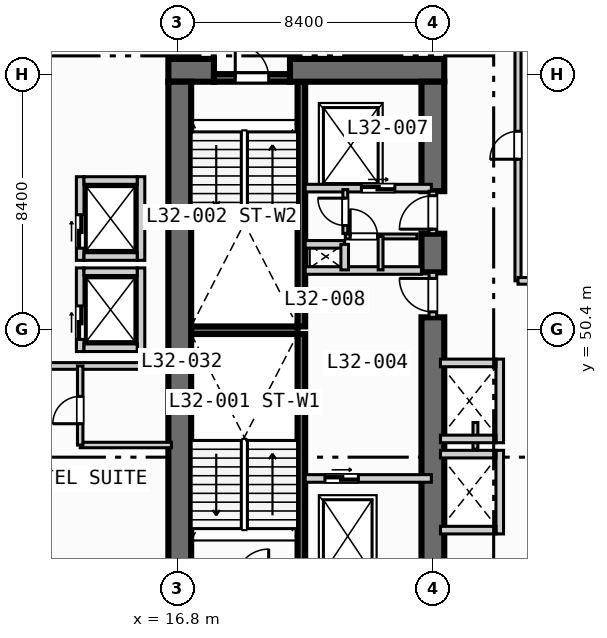
"""IFC4 building model, lengths in metres.
Left out: names, types, materials, properties, quantities, classifications, styles, units other than length and angle.
Written with IfcOpenShell. Run it as: python <this file> out.ifc"""

import sys

from ifc_helpers import new_model, si_unit, direction, frame, frame_2d, origin, place, context, subcontext, project, spatial, rectangle, extrude, element, fill, save


model = new_model("IFC4")
c1 = context("Model", 3, precision=1e-05, world=origin(), true_north=direction((0.0, 1.0)))
c2 = subcontext(c1, "Body", "Model", "MODEL_VIEW")
j1 = project(units=[si_unit("LENGTHUNIT", "METRE"), si_unit("PLANEANGLEUNIT", "RADIAN")], contexts=[c1])
p1 = place(None, origin())
s1 = spatial("IfcSite", under=j1, at=p1, CompositionType="ELEMENT")
p2 = place(p1, origin())
s2 = spatial("IfcBuilding", under=s1, at=p2, CompositionType="ELEMENT")
p3 = place(p2, frame((0.0, 0.0, 134.2)))
s3 = spatial("IfcBuildingStorey", under=s2, at=p3, CompositionType="ELEMENT", Elevation=134.2)
for number, where, z_axis, x_axis in (
    (1, (20.875, 42.2, 0.0), (0.0, 0.0, 1.0), (0.0, 1.0, 0.0)),
    (2, (20.875, 50.5, 0.0), (0.0, 0.0, 1.0), (0.0, 1.0, 0.0)),
):
    element("IfcWall", number, at=place(p3, frame(where, z_axis=z_axis, x_axis=x_axis)), inside=s3, PredefinedType="SOLIDWALL", context=c2, shape_type="SweptSolid", body=[
        extrude(rectangle(XDim=8.05, YDim=0.25, at=frame_2d((4.025, 0.0))), origin(), (0.0, 0.0, 1.0), 3.55),
    ])
p4 = place(p3, frame((17.25, 50.375, 0.0), z_axis=(0.0, 0.0, 1.0), x_axis=(1.0, 0.0, 0.0)))
e3 = element("IfcWall", 3, at=p4, inside=s3, PredefinedType="SOLIDWALL", context=c2, shape_type="SweptSolid", body=[
    extrude(rectangle(XDim=3.5, YDim=0.25, at=frame_2d((1.75, 0.0))), origin(), (0.0, 0.0, 1.0), 3.55),
])
p5 = place(p3, frame((16.5, 58.925, 0.0), z_axis=(0.0, 0.0, 1.0), x_axis=(1.0, 0.0, 0.0)))
e4 = element("IfcWall", 4, at=p5, inside=s3, PredefinedType="SHEAR", context=c2, shape_type="SweptSolid", body=[
    extrude(rectangle(XDim=1.5, YDim=0.75, at=frame_2d((0.75, 0.0))), origin(), (0.0, 0.0, 1.0), 3.55),
])
p6 = place(p3, frame((20.5, 58.925, 0.0), z_axis=(0.0, 0.0, 1.0), x_axis=(1.0, 0.0, 0.0)))
e5 = element("IfcWall", 5, at=p6, inside=s3, PredefinedType="SHEAR", context=c2, shape_type="SweptSolid", body=[
    extrude(rectangle(XDim=5.075, YDim=0.75, at=frame_2d((2.538, 0.0))), origin(), (0.0, 0.0, 1.0), 3.55),
])
p7 = place(p3, frame((16.875, 42.2, 0.0), z_axis=(0.0, 0.0, 1.0), x_axis=(0.0, 1.0, 0.0)))
e6 = element("IfcWall", 6, at=p7, inside=s3, PredefinedType="SHEAR", context=c2, shape_type="SweptSolid", body=[
    extrude(rectangle(XDim=16.35, YDim=0.75, at=frame_2d((8.175, 0.0))), origin(), (0.0, 0.0, 1.0), 3.55),
])
p8 = place(p3, frame((25.2, 42.2, 0.0), z_axis=(0.0, 0.0, 1.0), x_axis=(0.0, 1.0, 0.0)))
e7 = element("IfcWall", 7, at=p8, inside=s3, PredefinedType="SHEAR", context=c2, shape_type="SweptSolid", body=[
    extrude(rectangle(XDim=8.6, YDim=0.75, at=frame_2d((4.3, 0.0))), origin(), (0.0, 0.0, 1.0), 3.55),
])
p9 = place(p3, frame((25.2, 52.28, 0.0), z_axis=(0.0, 0.0, 1.0), x_axis=(0.0, 1.0, 0.0)))
e8 = element("IfcWall", 8, at=p9, inside=s3, PredefinedType="SHEAR", context=c2, shape_type="SweptSolid", body=[
    extrude(rectangle(XDim=1.27, YDim=0.75, at=frame_2d((0.635, 0.0))), origin(), (0.0, 0.0, 1.0), 3.55),
])
p10 = place(p3, frame((25.2, 54.95, 0.0), z_axis=(0.0, 0.0, 1.0), x_axis=(0.0, 1.0, 0.0)))
e9 = element("IfcWall", 9, at=p10, inside=s3, PredefinedType="SHEAR", context=c2, shape_type="SweptSolid", body=[
    extrude(rectangle(XDim=3.6, YDim=0.75, at=frame_2d((1.8, 0.0))), origin(), (0.0, 0.0, 1.0), 3.55),
])
p11 = place(p3, frame((18.0, 58.675, 0.0), z_axis=(0.0, 0.0, 1.0), x_axis=(1.0, 0.0, 0.0)))
e10 = element("IfcWall", 10, at=p11, inside=s3, PredefinedType="SOLIDWALL", context=c2, shape_type="SweptSolid", body=[
    extrude(rectangle(XDim=2.5, YDim=0.25, at=frame_2d((1.25, 0.0))), origin(), (0.0, 0.0, 1.0), 3.55),
])
p12 = place(p11, frame((0.7, 0.0, 0.0)))
e11 = element("IfcOpeningElement", 11, at=p12, cuts=e10, PredefinedType="OPENING", context=c2, shape_type="SweptSolid", body=[
    extrude(rectangle(XDim=1.1, YDim=2.15, at=frame_2d((0.55, 1.075))), frame((0.0, 0.135, 0.0), z_axis=(0.0, -1.0, 0.0), x_axis=(1.0, 0.0, 0.0)), (0.0, 0.0, 1.0), 0.27),
])
p13 = place(p3, frame((21.0, 45.5, 0.0), z_axis=(0.0, 0.0, 1.0), x_axis=(1.0, 0.0, 0.0)))
e12 = element("IfcWall", 12, at=p13, inside=s3, PredefinedType="SOLIDWALL", context=c2, shape_type="SweptSolid", body=[
    extrude(rectangle(XDim=4.15, YDim=0.25, at=frame_2d((2.075, 0.0))), origin(), (0.0, 0.0, 1.0), 3.55),
])
p14 = place(p13, frame((0.65, 0.0, 0.0)))
e13 = element("IfcOpeningElement", 13, at=p14, cuts=e12, PredefinedType="OPENING", context=c2, shape_type="SweptSolid", body=[
    extrude(rectangle(XDim=1.1, YDim=2.15, at=frame_2d((0.55, 1.075))), frame((0.0, 0.135, 0.0), z_axis=(0.0, -1.0, 0.0), x_axis=(1.0, 0.0, 0.0)), (0.0, 0.0, 1.0), 0.27),
])
p15 = place(p3, frame((25.2, 50.8, 0.0), z_axis=(0.0, 0.0, 1.0), x_axis=(0.0, 1.0, 0.0)))
e14 = element("IfcWall", 14, at=p15, inside=s3, PredefinedType="SOLIDWALL", context=c2, shape_type="SweptSolid", body=[
    extrude(rectangle(XDim=1.48, YDim=0.25, at=frame_2d((0.74, 0.0))), origin(), (0.0, 0.0, 1.0), 3.55),
])
p16 = place(p15, frame((0.18, 0.0, 0.0)))
e15 = element("IfcOpeningElement", 15, at=p16, cuts=e14, PredefinedType="OPENING", context=c2, shape_type="SweptSolid", body=[
    extrude(rectangle(XDim=1.1, YDim=2.15, at=frame_2d((0.55, 1.075))), frame((0.0, 0.135, 0.0), z_axis=(0.0, -1.0, 0.0), x_axis=(1.0, 0.0, 0.0)), (0.0, 0.0, 1.0), 0.27),
])
p17 = place(p3, frame((21.0, 52.34, 0.0), z_axis=(0.0, 0.0, 1.0), x_axis=(1.0, 0.0, 0.0)))
e16 = element("IfcWall", 16, at=p17, inside=s3, PredefinedType="SOLIDWALL", context=c2, shape_type="SweptSolid", body=[
    extrude(rectangle(XDim=3.825, YDim=0.25, at=frame_2d((1.913, 0.0))), origin(), (0.0, 0.0, 1.0), 3.55),
])
p18 = place(p3, frame((21.0, 55.05, 0.0), z_axis=(0.0, 0.0, 1.0), x_axis=(1.0, 0.0, 0.0)))
e17 = element("IfcWall", 17, at=p18, inside=s3, PredefinedType="SOLIDWALL", context=c2, shape_type="SweptSolid", body=[
    extrude(rectangle(XDim=4.15, YDim=0.25, at=frame_2d((2.075, 0.0))), origin(), (0.0, 0.0, 1.0), 3.55),
])
p19 = place(p18, frame((1.85, 0.0, 0.0)))
e18 = element("IfcOpeningElement", 18, at=p19, cuts=e17, PredefinedType="OPENING", context=c2, shape_type="SweptSolid", body=[
    extrude(rectangle(XDim=1.1, YDim=2.15, at=frame_2d((0.55, 1.075))), frame((0.0, 0.135, 0.0), z_axis=(0.0, -1.0, 0.0), x_axis=(1.0, 0.0, 0.0)), (0.0, 0.0, 1.0), 0.27),
])
p20 = place(p3, frame((25.2, 53.55, 0.0), z_axis=(0.0, 0.0, 1.0), x_axis=(0.0, 1.0, 0.0)))
e19 = element("IfcWall", 19, at=p20, inside=s3, PredefinedType="SOLIDWALL", context=c2, shape_type="SweptSolid", body=[
    extrude(rectangle(XDim=1.4, YDim=0.25, at=frame_2d((0.7, 0.0))), origin(), (0.0, 0.0, 1.0), 3.55),
])
p21 = place(p20, frame((0.15, 0.0, 0.0)))
e20 = element("IfcOpeningElement", 20, at=p21, cuts=e19, PredefinedType="OPENING", context=c2, shape_type="SweptSolid", body=[
    extrude(rectangle(XDim=1.1, YDim=2.15, at=frame_2d((0.55, 1.075))), frame((0.0, 0.135, 0.0), z_axis=(0.0, -1.0, 0.0), x_axis=(1.0, 0.0, 0.0)), (0.0, 0.0, 1.0), 0.27),
])
p22 = place(p3, frame((21.0, 53.2, 0.0), z_axis=(0.0, 0.0, 1.0), x_axis=(1.0, 0.0, 0.0)))
e21 = element("IfcWall", 21, at=p22, inside=s3, PredefinedType="SOLIDWALL", context=c2, shape_type="SweptSolid", body=[
    extrude(rectangle(XDim=1.3, YDim=0.25, at=frame_2d((0.65, 0.0))), origin(), (0.0, 0.0, 1.0), 3.55),
])
p23 = place(p3, frame((22.3, 52.36, 0.0), z_axis=(0.0, 0.0, 1.0), x_axis=(0.0, 1.0, 0.0)))
e22 = element("IfcWall", 22, at=p23, inside=s3, PredefinedType="SOLIDWALL", context=c2, shape_type="SweptSolid", body=[
    extrude(rectangle(XDim=0.84, YDim=0.25, at=frame_2d((0.42, 0.0))), origin(), (0.0, 0.0, 1.0), 3.55),
])
p24 = place(p3, frame((22.32, 53.56, 0.0), z_axis=(0.0, 0.0, 1.0), x_axis=(0.0, 1.0, 0.0)))
e23 = element("IfcWall", 23, at=p24, inside=s3, PredefinedType="PARTITIONING", context=c2, shape_type="SweptSolid", body=[
    extrude(rectangle(XDim=1.44, YDim=0.16, at=frame_2d((0.72, 0.0))), origin(), (0.0, 0.0, 1.0), 3.55),
])
p25 = place(p24, frame((0.26, 0.0, 0.0)))
e24 = element("IfcOpeningElement", 24, at=p25, cuts=e23, PredefinedType="OPENING", context=c2, shape_type="SweptSolid", body=[
    extrude(rectangle(XDim=0.9, YDim=2.1, at=frame_2d((0.45, 1.05))), frame((0.0, 0.09, 0.0), z_axis=(0.0, -1.0, 0.0), x_axis=(1.0, 0.0, 0.0)), (0.0, 0.0, 1.0), 0.18),
])
p26 = place(p3, frame((22.32, 53.46, 0.0), z_axis=(0.0, 0.0, 1.0), x_axis=(1.0, 0.0, 0.0)))
e25 = element("IfcWall", 25, at=p26, inside=s3, PredefinedType="PARTITIONING", context=c2, shape_type="SweptSolid", body=[
    extrude(rectangle(XDim=2.36, YDim=0.16, at=frame_2d((1.18, 0.0))), origin(), (0.0, 0.0, 1.0), 3.55),
])
p27 = place(p26, frame((0.16, 0.0, 0.0)))
e26 = element("IfcOpeningElement", 26, at=p27, cuts=e25, PredefinedType="OPENING", context=c2, shape_type="SweptSolid", body=[
    extrude(rectangle(XDim=0.9, YDim=2.1, at=frame_2d((0.45, 1.05))), frame((0.0, 0.09, 0.0), z_axis=(0.0, -1.0, 0.0), x_axis=(1.0, 0.0, 0.0)), (0.0, 0.0, 1.0), 0.18),
])
p28 = place(p3, frame((23.48, 52.36, 0.0), z_axis=(0.0, 0.0, 1.0), x_axis=(0.0, 1.0, 0.0)))
e27 = element("IfcWall", 27, at=p28, inside=s3, PredefinedType="PARTITIONING", context=c2, shape_type="SweptSolid", body=[
    extrude(rectangle(XDim=1.1, YDim=0.16, at=frame_2d((0.55, 0.0))), origin(), (0.0, 0.0, 1.0), 3.55),
])
p29 = place(p3, frame((13.6, 49.675, 0.0), z_axis=(0.0, 0.0, 1.0), x_axis=(0.0, 1.0, 0.0)))
e28 = element("IfcWall", 28, at=p29, inside=s3, PredefinedType="SOLIDWALL", context=c2, shape_type="SweptSolid", body=[
    extrude(rectangle(XDim=2.75, YDim=0.25, at=frame_2d((1.375, 0.0))), origin(), (0.0, 0.0, 1.0), 3.55),
])
p30 = place(p29, frame((0.4, 0.0, 0.0)))
e29 = element("IfcOpeningElement", 29, at=p30, cuts=e28, PredefinedType="OPENING", context=c2, shape_type="SweptSolid", body=[
    extrude(rectangle(XDim=1.1, YDim=2.15, at=frame_2d((0.55, 1.075))), frame((0.0, 0.135, 0.0), z_axis=(0.0, -1.0, 0.0), x_axis=(1.0, 0.0, 0.0)), (0.0, 0.0, 1.0), 0.27),
])
p31 = place(p3, frame((15.6, 49.675, 0.0), z_axis=(0.0, 0.0, 1.0), x_axis=(0.0, 1.0, 0.0)))
e30 = element("IfcWall", 30, at=p31, inside=s3, PredefinedType="SOLIDWALL", context=c2, shape_type="SweptSolid", body=[
    extrude(rectangle(XDim=2.75, YDim=0.25, at=frame_2d((1.375, 0.0))), origin(), (0.0, 0.0, 1.0), 3.55),
])
for number, where, z_axis, x_axis in (
    (31, (13.725, 49.8, 0.0), (0.0, 0.0, 1.0), (1.0, 0.0, 0.0)),
    (32, (13.725, 52.3, 0.0), (0.0, 0.0, 1.0), (1.0, 0.0, 0.0)),
):
    element("IfcWall", number, at=place(p3, frame(where, z_axis=z_axis, x_axis=x_axis)), inside=s3, PredefinedType="SOLIDWALL", context=c2, shape_type="SweptSolid", body=[
        extrude(rectangle(XDim=1.75, YDim=0.25, at=frame_2d((0.875, 0.0))), origin(), (0.0, 0.0, 1.0), 3.55),
    ])
p32 = place(p3, frame((13.6, 52.675, 0.0), z_axis=(0.0, 0.0, 1.0), x_axis=(0.0, 1.0, 0.0)))
e33 = element("IfcWall", 33, at=p32, inside=s3, PredefinedType="SOLIDWALL", context=c2, shape_type="SweptSolid", body=[
    extrude(rectangle(XDim=2.75, YDim=0.25, at=frame_2d((1.375, 0.0))), origin(), (0.0, 0.0, 1.0), 3.55),
])
p33 = place(p32, frame((0.4, 0.0, 0.0)))
e34 = element("IfcOpeningElement", 34, at=p33, cuts=e33, PredefinedType="OPENING", context=c2, shape_type="SweptSolid", body=[
    extrude(rectangle(XDim=1.1, YDim=2.15, at=frame_2d((0.55, 1.075))), frame((0.0, 0.135, 0.0), z_axis=(0.0, -1.0, 0.0), x_axis=(1.0, 0.0, 0.0)), (0.0, 0.0, 1.0), 0.27),
])
p34 = place(p3, frame((15.6, 52.675, 0.0), z_axis=(0.0, 0.0, 1.0), x_axis=(0.0, 1.0, 0.0)))
e35 = element("IfcWall", 35, at=p34, inside=s3, PredefinedType="SOLIDWALL", context=c2, shape_type="SweptSolid", body=[
    extrude(rectangle(XDim=2.75, YDim=0.25, at=frame_2d((1.375, 0.0))), origin(), (0.0, 0.0, 1.0), 3.55),
])
for number, where, z_axis, x_axis in (
    (36, (13.725, 52.8, 0.0), (0.0, 0.0, 1.0), (1.0, 0.0, 0.0)),
    (37, (13.725, 55.3, 0.0), (0.0, 0.0, 1.0), (1.0, 0.0, 0.0)),
):
    element("IfcWall", number, at=place(p3, frame(where, z_axis=z_axis, x_axis=x_axis)), inside=s3, PredefinedType="SOLIDWALL", context=c2, shape_type="SweptSolid", body=[
        extrude(rectangle(XDim=1.75, YDim=0.25, at=frame_2d((0.875, 0.0))), origin(), (0.0, 0.0, 1.0), 3.55),
    ])
p35 = place(p3, frame((27.4, 43.675, 0.0), z_axis=(0.0, 0.0, 1.0), x_axis=(0.0, 1.0, 0.0)))
e38 = element("IfcWall", 38, at=p35, inside=s3, PredefinedType="SOLIDWALL", context=c2, shape_type="SweptSolid", body=[
    extrude(rectangle(XDim=2.75, YDim=0.25, at=frame_2d((1.375, 0.0))), origin(), (0.0, 0.0, 1.0), 3.55),
])
for number, where, z_axis, x_axis in (
    (39, (25.45, 43.8, 0.0), (0.0, 0.0, 1.0), (1.0, 0.0, 0.0)),
    (40, (25.45, 46.3, 0.0), (0.0, 0.0, 1.0), (1.0, 0.0, 0.0)),
):
    element("IfcWall", number, at=place(p3, frame(where, z_axis=z_axis, x_axis=x_axis)), inside=s3, PredefinedType="SOLIDWALL", context=c2, shape_type="SweptSolid", body=[
        extrude(rectangle(XDim=1.825, YDim=0.25, at=frame_2d((0.913, 0.0))), origin(), (0.0, 0.0, 1.0), 3.55),
    ])
p36 = place(p3, frame((26.6, 46.46, 0.0), z_axis=(0.0, 0.0, 1.0), x_axis=(0.0, 1.0, 0.0)))
e41 = element("IfcWall", 41, at=p36, inside=s3, PredefinedType="PARTITIONING", context=c2, shape_type="SweptSolid", body=[
    extrude(rectangle(XDim=0.88, YDim=0.16, at=frame_2d((0.44, 0.0))), origin(), (0.0, 0.0, 1.0), 3.55),
])
p37 = place(p3, frame((27.4, 46.675, 0.0), z_axis=(0.0, 0.0, 1.0), x_axis=(0.0, 1.0, 0.0)))
e42 = element("IfcWall", 42, at=p37, inside=s3, PredefinedType="SOLIDWALL", context=c2, shape_type="SweptSolid", body=[
    extrude(rectangle(XDim=2.75, YDim=0.25, at=frame_2d((1.375, 0.0))), origin(), (0.0, 0.0, 1.0), 3.55),
])
for number, where, z_axis, x_axis in (
    (43, (25.45, 46.8, 0.0), (0.0, 0.0, 1.0), (1.0, 0.0, 0.0)),
    (44, (25.45, 49.3, 0.0), (0.0, 0.0, 1.0), (1.0, 0.0, 0.0)),
):
    element("IfcWall", number, at=place(p3, frame(where, z_axis=z_axis, x_axis=x_axis)), inside=s3, PredefinedType="SOLIDWALL", context=c2, shape_type="SweptSolid", body=[
        extrude(rectangle(XDim=1.825, YDim=0.25, at=frame_2d((0.913, 0.0))), origin(), (0.0, 0.0, 1.0), 3.55),
    ])
p38 = place(p3, frame((0.35, 49.2, 0.0), z_axis=(0.0, 0.0, 1.0), x_axis=(1.0, 0.0, 0.0)))
e45 = element("IfcWall", 45, at=p38, inside=s3, PredefinedType="PARTITIONING", context=c2, shape_type="SweptSolid", body=[
    extrude(rectangle(XDim=16.25, YDim=0.22, at=frame_2d((8.125, 0.0))), origin(), (0.0, 0.0, 1.0), 3.55),
])
p39 = place(p3, frame((13.6, 46.6, 0.0), z_axis=(0.0, 0.0, 1.0), x_axis=(1.0, 0.0, 0.0)))
e46 = element("IfcWall", 46, at=p39, inside=s3, PredefinedType="PLUMBINGWALL", context=c2, shape_type="SweptSolid", body=[
    extrude(rectangle(XDim=3.0, YDim=0.18, at=frame_2d((1.5, 0.0))), origin(), (0.0, 0.0, 1.0), 3.55),
])
p40 = place(p3, frame((13.6, 46.6, 0.0), z_axis=(0.0, 0.0, 1.0), x_axis=(0.0, 1.0, 0.0)))
e47 = element("IfcWall", 47, at=p40, inside=s3, PredefinedType="PLUMBINGWALL", context=c2, shape_type="SweptSolid", body=[
    extrude(rectangle(XDim=2.6, YDim=0.18, at=frame_2d((1.3, 0.0))), origin(), (0.0, 0.0, 1.0), 3.55),
])
p41 = place(p40, frame((0.7, 0.0, 0.0)))
e48 = element("IfcOpeningElement", 48, at=p41, cuts=e47, PredefinedType="OPENING", context=c2, shape_type="SweptSolid", body=[
    extrude(rectangle(XDim=0.9, YDim=2.1, at=frame_2d((0.45, 1.05))), frame((0.0, 0.1, 0.0), z_axis=(0.0, -1.0, 0.0), x_axis=(1.0, 0.0, 0.0)), (0.0, 0.0, 1.0), 0.2),
])
p42 = place(p3, frame((28.0, 52.0, 0.0), z_axis=(0.0, 0.0, 1.0), x_axis=(0.0, 1.0, 0.0)))
e49 = element("IfcWall", 49, at=p42, inside=s3, PredefinedType="PARTITIONING", context=c2, shape_type="SweptSolid", body=[
    extrude(rectangle(XDim=37.0, YDim=0.2, at=frame_2d((18.5, 0.0))), origin(), (0.0, 0.0, 1.0), 3.55),
])
p43 = place(p42, frame((4.0, 0.0, 0.0)))
e50 = element("IfcOpeningElement", 50, at=p43, cuts=e49, PredefinedType="OPENING", context=c2, shape_type="SweptSolid", body=[
    extrude(rectangle(XDim=0.92, YDim=2.1, at=frame_2d((0.46, 1.05))), frame((0.0, 0.11, 0.0), z_axis=(0.0, -1.0, 0.0), x_axis=(1.0, 0.0, 0.0)), (0.0, 0.0, 1.0), 0.22),
])
p44 = place(p3, frame((28.0, 52.0, 0.0), z_axis=(0.0, 0.0, 1.0), x_axis=(1.0, 0.0, 0.0)))
e51 = element("IfcWall", 51, at=p44, inside=s3, PredefinedType="PARTITIONING", context=c2, shape_type="SweptSolid", body=[
    extrude(rectangle(XDim=5.3, YDim=0.22, at=frame_2d((2.65, 0.0))), origin(), (0.0, 0.0, 1.0), 3.55),
])
p45 = place(p12, origin())
e52 = element("IfcDoor", 52, at=p45, inside=s3, OperationType="SINGLE_SWING_LEFT", PredefinedType="DOOR", context=c2, shape_type="SweptSolid", body=[
    extrude(rectangle(XDim=1.1, YDim=2.15, at=frame_2d((0.55, 1.075))), frame((0.0, 0.025, 0.0), z_axis=(0.0, -1.0, 0.0), x_axis=(1.0, 0.0, 0.0)), (0.0, 0.0, 1.0), 0.05),
])
fill(e11, e52)
p46 = place(p14, origin())
e53 = element("IfcDoor", 53, at=p46, inside=s3, OperationType="SLIDING_TO_LEFT", PredefinedType="DOOR", context=c2, shape_type="SweptSolid", body=[
    extrude(rectangle(XDim=1.1, YDim=2.15, at=frame_2d((0.55, 1.075))), frame((0.0, 0.025, 0.0), z_axis=(0.0, -1.0, 0.0), x_axis=(1.0, 0.0, 0.0)), (0.0, 0.0, 1.0), 0.05),
])
fill(e13, e53)
p47 = place(p16, origin())
e54 = element("IfcDoor", 54, at=p47, inside=s3, OperationType="SINGLE_SWING_RIGHT", PredefinedType="DOOR", context=c2, shape_type="SweptSolid", body=[
    extrude(rectangle(XDim=1.1, YDim=2.15, at=frame_2d((0.55, 1.075))), frame((0.0, 0.025, 0.0), z_axis=(0.0, -1.0, 0.0), x_axis=(1.0, 0.0, 0.0)), (0.0, 0.0, 1.0), 0.05),
])
fill(e15, e54)
p48 = place(p19, origin())
e55 = element("IfcDoor", 55, at=p48, inside=s3, OperationType="SLIDING_TO_LEFT", PredefinedType="DOOR", context=c2, shape_type="SweptSolid", body=[
    extrude(rectangle(XDim=1.1, YDim=2.15, at=frame_2d((0.55, 1.075))), frame((0.0, 0.025, 0.0), z_axis=(0.0, -1.0, 0.0), x_axis=(1.0, 0.0, 0.0)), (0.0, 0.0, 1.0), 0.05),
])
fill(e18, e55)
p49 = place(p21, origin())
e56 = element("IfcDoor", 56, at=p49, inside=s3, OperationType="SINGLE_SWING_LEFT", PredefinedType="DOOR", context=c2, shape_type="SweptSolid", body=[
    extrude(rectangle(XDim=1.1, YDim=2.15, at=frame_2d((0.55, 1.075))), frame((0.0, 0.025, 0.0), z_axis=(0.0, -1.0, 0.0), x_axis=(1.0, 0.0, 0.0)), (0.0, 0.0, 1.0), 0.05),
])
fill(e20, e56)
p50 = place(p25, origin())
e57 = element("IfcDoor", 57, at=p50, inside=s3, OperationType="SINGLE_SWING_RIGHT", PredefinedType="DOOR", context=c2, shape_type="SweptSolid", body=[
    extrude(rectangle(XDim=0.9, YDim=2.1, at=frame_2d((0.45, 1.05))), frame((0.0, 0.025, 0.0), z_axis=(0.0, -1.0, 0.0), x_axis=(1.0, 0.0, 0.0)), (0.0, 0.0, 1.0), 0.05),
])
fill(e24, e57)
p51 = place(p27, origin())
e58 = element("IfcDoor", 58, at=p51, inside=s3, OperationType="SINGLE_SWING_LEFT", PredefinedType="DOOR", context=c2, shape_type="SweptSolid", body=[
    extrude(rectangle(XDim=0.9, YDim=2.1, at=frame_2d((0.45, 1.05))), frame((0.0, 0.025, 0.0), z_axis=(0.0, -1.0, 0.0), x_axis=(1.0, 0.0, 0.0)), (0.0, 0.0, 1.0), 0.05),
])
fill(e26, e58)
p52 = place(p30, origin())
e59 = element("IfcDoor", 59, at=p52, inside=s3, OperationType="SLIDING_TO_LEFT", PredefinedType="DOOR", context=c2, shape_type="SweptSolid", body=[
    extrude(rectangle(XDim=1.1, YDim=2.15, at=frame_2d((0.55, 1.075))), frame((0.0, 0.025, 0.0), z_axis=(0.0, -1.0, 0.0), x_axis=(1.0, 0.0, 0.0)), (0.0, 0.0, 1.0), 0.05),
])
fill(e29, e59)
p53 = place(p33, origin())
e60 = element("IfcDoor", 60, at=p53, inside=s3, OperationType="SLIDING_TO_LEFT", PredefinedType="DOOR", context=c2, shape_type="SweptSolid", body=[
    extrude(rectangle(XDim=1.1, YDim=2.15, at=frame_2d((0.55, 1.075))), frame((0.0, 0.025, 0.0), z_axis=(0.0, -1.0, 0.0), x_axis=(1.0, 0.0, 0.0)), (0.0, 0.0, 1.0), 0.05),
])
fill(e34, e60)
p54 = place(p41, origin())
e61 = element("IfcDoor", 61, at=p54, inside=s3, OperationType="SINGLE_SWING_LEFT", PredefinedType="DOOR", context=c2, shape_type="SweptSolid", body=[
    extrude(rectangle(XDim=0.9, YDim=2.1, at=frame_2d((0.45, 1.05))), frame((0.0, 0.025, 0.0), z_axis=(0.0, -1.0, 0.0), x_axis=(1.0, 0.0, 0.0)), (0.0, 0.0, 1.0), 0.05),
])
fill(e48, e61)
p55 = place(p43, origin())
e62 = element("IfcDoor", 62, at=p55, inside=s3, OperationType="SINGLE_SWING_LEFT", PredefinedType="DOOR", context=c2, shape_type="SweptSolid", body=[
    extrude(rectangle(XDim=0.92, YDim=2.1, at=frame_2d((0.46, 1.05))), frame((0.0, 0.025, 0.0), z_axis=(0.0, -1.0, 0.0), x_axis=(1.0, 0.0, 0.0)), (0.0, 0.0, 1.0), 0.05),
])
fill(e50, e62)
save(model, sys.argv[1])
